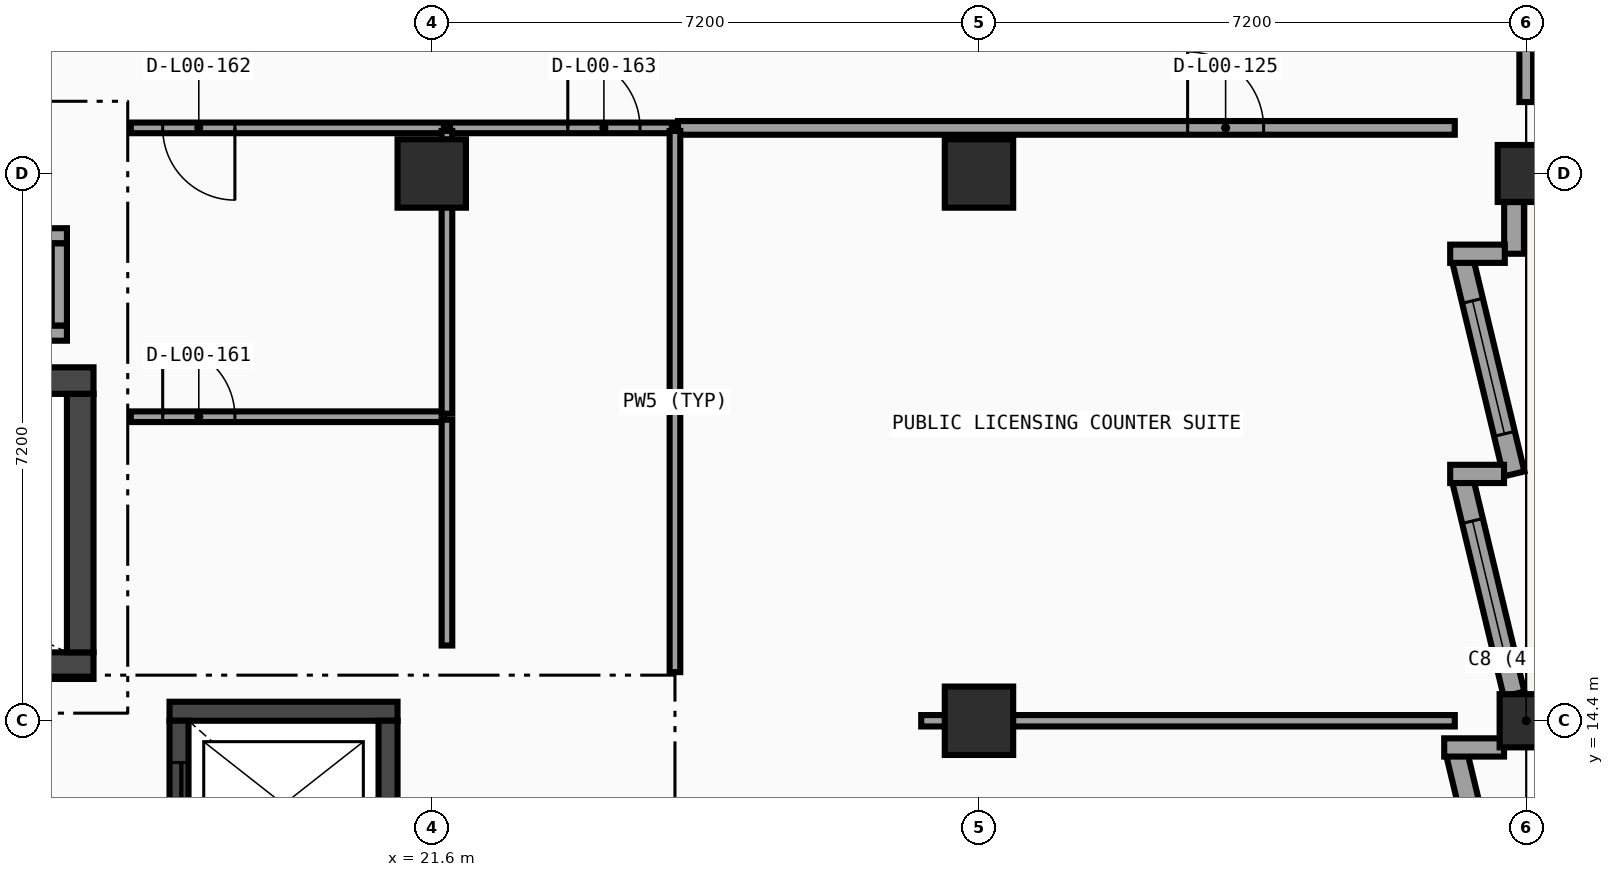
"""IFC4 building model, lengths in metres.
Left out: names, types, materials, properties, quantities, classifications, styles, units other than length and angle.
Written with IfcOpenShell. Run it as: python <this file> out.ifc"""

import sys

from ifc_helpers import new_model, si_unit, direction, frame, frame_2d, origin, origin_2d, place, context, subcontext, project, spatial, rectangle, circle, extrude, element, fill, save


model = new_model("IFC4")
c1 = context("Model", 3, precision=1e-05, world=origin(), true_north=direction((0.0, 1.0)))
c2 = subcontext(c1, "Body", "Model", "MODEL_VIEW")
j1 = project(units=[si_unit("LENGTHUNIT", "METRE"), si_unit("PLANEANGLEUNIT", "RADIAN")], contexts=[c1])
p1 = place(None, origin())
s1 = spatial("IfcSite", under=j1, at=p1, CompositionType="ELEMENT")
p2 = place(p1, origin())
s2 = spatial("IfcBuilding", under=s1, at=p2, CompositionType="ELEMENT")
p3 = place(p2, origin())
s3 = spatial("IfcBuildingStorey", under=s2, at=p3, CompositionType="ELEMENT", Elevation=0.0)
for number, where, z_axis, x_axis in (
    (1, (21.6, 21.6, 0.0), (0.0, 0.0, 1.0), (1.0, 0.0, 0.0)),
    (2, (28.8, 14.4, 0.0), (0.0, 0.0, 1.0), (1.0, 0.0, 0.0)),
    (3, (28.8, 21.6, 0.0), (0.0, 0.0, 1.0), (1.0, 0.0, 0.0)),
):
    element("IfcColumn", number, at=place(p3, frame(where, z_axis=z_axis, x_axis=x_axis)), inside=s3, PredefinedType="COLUMN", context=c2, shape_type="SweptSolid", body=[
        extrude(rectangle(XDim=0.9, YDim=0.9, at=origin_2d()), origin(), (0.0, 0.0, 1.0), 5.4),
    ])
p4 = place(p3, frame((36.0, 14.4, 0.0), z_axis=(0.0, 0.0, 1.0), x_axis=(1.0, 0.0, 0.0)))
e4 = element("IfcColumn", 4, at=p4, inside=s3, PredefinedType="COLUMN", context=c2, shape_type="SweptSolid", body=[
    extrude(circle(Radius=0.35, at=origin_2d()), origin(), (0.0, 0.0, 1.0), 5.4),
])
p5 = place(p3, frame((36.0, 21.6, 0.0), z_axis=(0.0, 0.0, 1.0), x_axis=(1.0, 0.0, 0.0)))
e5 = element("IfcColumn", 5, at=p5, inside=s3, PredefinedType="COLUMN", context=c2, shape_type="SweptSolid", body=[
    extrude(rectangle(XDim=0.75, YDim=0.75, at=origin_2d()), origin(), (0.0, 0.0, 1.0), 5.4),
])
p6 = place(p3, frame((35.84, 21.224, 0.0), z_axis=(0.0, 0.0, 1.0), x_axis=(0.0, -1.0, 0.0)))
e6 = element("IfcWall", 6, at=p6, inside=s3, PredefinedType="SOLIDWALL", context=c2, shape_type="SweptSolid", body=[
    extrude(rectangle(XDim=0.68, YDim=0.26, at=frame_2d((0.34, 0.0))), origin(), (0.0, 0.0, 1.0), 4.461),
])
p7 = place(p3, frame((35.167, 20.452, 0.0), z_axis=(0.0, 0.0, 1.0), x_axis=(0.233481813001, -0.97236116901, 0.0)))
e7 = element("IfcWall", 7, at=p7, inside=s3, PredefinedType="SOLIDWALL", context=c2, shape_type="SweptSolid", body=[
    extrude(rectangle(XDim=2.884, YDim=0.28, at=frame_2d((1.442, 0.0))), origin(), (0.0, 0.0, 1.0), 4.461),
])
p8 = place(p7, frame((0.542, 0.0, 0.8)))
e8 = element("IfcOpeningElement", 8, at=p8, cuts=e7, PredefinedType="OPENING", context=c2, shape_type="SweptSolid", body=[
    extrude(rectangle(XDim=1.8, YDim=1.85, at=frame_2d((0.9, 0.925))), frame((0.0, 0.15, 0.0), z_axis=(0.0, -1.0, 0.0), x_axis=(1.0, 0.0, 0.0)), (0.0, 0.0, 1.0), 0.3),
])
p9 = place(p3, frame((35.0, 20.544, 0.0), z_axis=(0.0, 0.0, 1.0), x_axis=(1.0, 0.0, 0.0)))
e9 = element("IfcWall", 9, at=p9, inside=s3, PredefinedType="SOLIDWALL", context=c2, shape_type="SweptSolid", body=[
    extrude(rectangle(XDim=0.719, YDim=0.24, at=frame_2d((0.359, 0.0))), origin(), (0.0, 0.0, 1.0), 5.12),
])
p10 = place(p3, frame((35.167, 17.555, 0.0), z_axis=(0.0, 0.0, 1.0), x_axis=(0.233481813001, -0.97236116901, 0.0)))
e10 = element("IfcWall", 10, at=p10, inside=s3, PredefinedType="SOLIDWALL", context=c2, shape_type="SweptSolid", body=[
    extrude(rectangle(XDim=2.884, YDim=0.28, at=frame_2d((1.442, 0.0))), origin(), (0.0, 0.0, 1.0), 4.461),
])
p11 = place(p10, frame((0.542, 0.0, 0.8)))
e11 = element("IfcOpeningElement", 11, at=p11, cuts=e10, PredefinedType="OPENING", context=c2, shape_type="SweptSolid", body=[
    extrude(rectangle(XDim=1.8, YDim=1.85, at=frame_2d((0.9, 0.925))), frame((0.0, 0.15, 0.0), z_axis=(0.0, -1.0, 0.0), x_axis=(1.0, 0.0, 0.0)), (0.0, 0.0, 1.0), 0.3),
])
p12 = place(p3, frame((35.0, 17.647, 0.0), z_axis=(0.0, 0.0, 1.0), x_axis=(1.0, 0.0, 0.0)))
e12 = element("IfcWall", 12, at=p12, inside=s3, PredefinedType="SOLIDWALL", context=c2, shape_type="SweptSolid", body=[
    extrude(rectangle(XDim=0.708, YDim=0.24, at=frame_2d((0.354, 0.0))), origin(), (0.0, 0.0, 1.0), 5.12),
])
p13 = place(p3, frame((35.088, 13.957, 0.0), z_axis=(0.0, 0.0, 1.0), x_axis=(0.233481900362, -0.972361148033, 0.0)))
e13 = element("IfcWall", 13, at=p13, inside=s3, PredefinedType="SOLIDWALL", context=c2, shape_type="SweptSolid", body=[
    extrude(rectangle(XDim=3.221, YDim=0.28, at=frame_2d((1.61, 0.0))), origin(), (0.0, 0.0, 1.0), 4.461),
])
p14 = place(p13, frame((0.81, 0.0, 0.8)))
e14 = element("IfcOpeningElement", 14, at=p14, cuts=e13, PredefinedType="OPENING", context=c2, shape_type="SweptSolid", body=[
    extrude(rectangle(XDim=1.6, YDim=1.75, at=frame_2d((0.8, 0.875))), frame((0.0, 0.15, 0.0), z_axis=(0.0, -1.0, 0.0), x_axis=(1.0, 0.0, 0.0)), (0.0, 0.0, 1.0), 0.3),
])
p15 = place(p3, frame((34.921, 14.049, 0.0), z_axis=(0.0, 0.0, 1.0), x_axis=(1.0, 0.0, 0.0)))
e15 = element("IfcWall", 15, at=p15, inside=s3, PredefinedType="SOLIDWALL", context=c2, shape_type="SweptSolid", body=[
    extrude(rectangle(XDim=0.787, YDim=0.24, at=frame_2d((0.394, 0.0))), origin(), (0.0, 0.0, 1.0), 5.12),
])
for number, where, z_axis, x_axis in (
    (16, (7.85, 15.125, 0.0), (0.0, 0.0, 1.0), (1.0, 0.0, 0.0)),
    (17, (17.15, 18.875, 0.0), (0.0, 0.0, 1.0), (-1.0, 0.0, 0.0)),
):
    element("IfcWall", number, at=place(p3, frame(where, z_axis=z_axis, x_axis=x_axis)), inside=s3, PredefinedType="SHEAR", context=c2, shape_type="SweptSolid", body=[
        extrude(rectangle(XDim=9.3, YDim=0.35, at=frame_2d((4.65, 0.0))), origin(), (0.0, 0.0, 1.0), 5.12),
    ])
p16 = place(p3, frame((16.975, 15.3, 0.0), z_axis=(0.0, 0.0, 1.0), x_axis=(0.0, 1.0, 0.0)))
e18 = element("IfcWall", 18, at=p16, inside=s3, PredefinedType="SHEAR", context=c2, shape_type="SweptSolid", body=[
    extrude(rectangle(XDim=3.4, YDim=0.35, at=frame_2d((1.7, 0.0))), origin(), (0.0, 0.0, 1.0), 5.12),
])
p17 = place(p3, frame((21.15, 14.525, 0.0), z_axis=(0.0, 0.0, 1.0), x_axis=(-1.0, 0.0, 0.0)))
e19 = element("IfcWall", 19, at=p17, inside=s3, PredefinedType="SHEAR", context=c2, shape_type="SweptSolid", body=[
    extrude(rectangle(XDim=3.0, YDim=0.25, at=frame_2d((1.5, 0.0))), origin(), (0.0, 0.0, 1.0), 5.12),
])
p18 = place(p3, frame((18.275, 14.4, 0.0), z_axis=(0.0, 0.0, 1.0), x_axis=(0.0, -1.0, 0.0)))
e20 = element("IfcWall", 20, at=p18, inside=s3, PredefinedType="SHEAR", context=c2, shape_type="SweptSolid", body=[
    extrude(rectangle(XDim=2.2, YDim=0.25, at=frame_2d((1.1, 0.0))), origin(), (0.0, 0.0, 1.0), 5.12),
])
p19 = place(p18, frame((0.55, 0.0, 0.0)))
e21 = element("IfcOpeningElement", 21, at=p19, cuts=e20, PredefinedType="OPENING", context=c2, shape_type="SweptSolid", body=[
    extrude(rectangle(XDim=1.1, YDim=2.1, at=frame_2d((0.55, 1.05))), frame((0.0, 0.135, 0.0), z_axis=(0.0, -1.0, 0.0), x_axis=(1.0, 0.0, 0.0)), (0.0, 0.0, 1.0), 0.27),
])
p20 = place(p3, frame((21.025, 12.2, 0.0), z_axis=(0.0, 0.0, 1.0), x_axis=(0.0, 1.0, 0.0)))
e22 = element("IfcWall", 22, at=p20, inside=s3, PredefinedType="SHEAR", context=c2, shape_type="SweptSolid", body=[
    extrude(rectangle(XDim=2.2, YDim=0.25, at=frame_2d((1.1, 0.0))), origin(), (0.0, 0.0, 1.0), 5.12),
])
for number, where, z_axis, x_axis in (
    (23, (15.2, 19.5, 0.0), (0.0, 0.0, 1.0), (1.0, 0.0, 0.0)),
    (24, (16.8, 20.78, 0.0), (0.0, 0.0, 1.0), (-1.0, 0.0, 0.0)),
):
    element("IfcWall", number, at=place(p3, frame(where, z_axis=z_axis, x_axis=x_axis)), inside=s3, PredefinedType="SOLIDWALL", context=c2, shape_type="SweptSolid", body=[
        extrude(rectangle(XDim=1.6, YDim=0.2, at=frame_2d((0.8, 0.0))), origin(), (0.0, 0.0, 1.0), 5.12),
    ])
p21 = place(p3, frame((16.7, 19.6, 0.0), z_axis=(0.0, 0.0, 1.0), x_axis=(0.0, 1.0, 0.0)))
e25 = element("IfcWall", 25, at=p21, inside=s3, PredefinedType="SOLIDWALL", context=c2, shape_type="SweptSolid", body=[
    extrude(rectangle(XDim=1.08, YDim=0.2, at=frame_2d((0.54, 0.0))), origin(), (0.0, 0.0, 1.0), 5.12),
])
p22 = place(p3, frame((24.84, 22.2, 0.0), z_axis=(0.0, 0.0, 1.0), x_axis=(1.0, 0.0, 0.0)))
e26 = element("IfcWall", 26, at=p22, inside=s3, PredefinedType="PARTITIONING", context=c2, shape_type="SweptSolid", body=[
    extrude(rectangle(XDim=10.22, YDim=0.18, at=frame_2d((5.11, 0.0))), origin(), (0.0, 0.0, 1.0), 4.311),
])
p23 = place(p22, frame((6.705, 0.0, 0.0)))
e27 = element("IfcOpeningElement", 27, at=p23, cuts=e26, PredefinedType="OPENING", context=c2, shape_type="SweptSolid", body=[
    extrude(rectangle(XDim=1.0, YDim=2.1, at=frame_2d((0.5, 1.05))), frame((0.0, 0.1, 0.0), z_axis=(0.0, -1.0, 0.0), x_axis=(1.0, 0.0, 0.0)), (0.0, 0.0, 1.0), 0.2),
])
p24 = place(p3, frame((36.0, 22.54, 0.0), z_axis=(0.0, 0.0, 1.0), x_axis=(0.0, 1.0, 0.0)))
e28 = element("IfcWall", 28, at=p24, inside=s3, PredefinedType="PARTITIONING", context=c2, shape_type="SweptSolid", body=[
    extrude(rectangle(XDim=2.22, YDim=0.18, at=frame_2d((1.11, 0.0))), origin(), (0.0, 0.0, 1.0), 4.461),
])
p25 = place(p3, frame((17.64, 22.2, 0.0), z_axis=(0.0, 0.0, 1.0), x_axis=(1.0, 0.0, 0.0)))
e29 = element("IfcWall", 29, at=p25, inside=s3, PredefinedType="PARTITIONING", context=c2, shape_type="SweptSolid", body=[
    extrude(rectangle(XDim=4.12, YDim=0.14, at=frame_2d((2.06, 0.0))), origin(), (0.0, 0.0, 1.0), 4.311),
])
p26 = place(p25, frame((0.42, 0.0, 0.0)))
e30 = element("IfcOpeningElement", 30, at=p26, cuts=e29, PredefinedType="OPENING", context=c2, shape_type="SweptSolid", body=[
    extrude(rectangle(XDim=0.95, YDim=2.08, at=frame_2d((0.475, 1.04))), frame((0.0, 0.08, 0.0), z_axis=(0.0, -1.0, 0.0), x_axis=(1.0, 0.0, 0.0)), (0.0, 0.0, 1.0), 0.16),
])
p27 = place(p3, frame((21.84, 22.2, 0.0), z_axis=(0.0, 0.0, 1.0), x_axis=(1.0, 0.0, 0.0)))
e31 = element("IfcWall", 31, at=p27, inside=s3, PredefinedType="PARTITIONING", context=c2, shape_type="SweptSolid", body=[
    extrude(rectangle(XDim=2.92, YDim=0.14, at=frame_2d((1.46, 0.0))), origin(), (0.0, 0.0, 1.0), 4.311),
])
p28 = place(p27, frame((1.55, 0.0, 0.0)))
e32 = element("IfcOpeningElement", 32, at=p28, cuts=e31, PredefinedType="OPENING", context=c2, shape_type="SweptSolid", body=[
    extrude(rectangle(XDim=0.95, YDim=2.08, at=frame_2d((0.475, 1.04))), frame((0.0, 0.08, 0.0), z_axis=(0.0, -1.0, 0.0), x_axis=(1.0, 0.0, 0.0)), (0.0, 0.0, 1.0), 0.16),
])
p29 = place(p3, frame((28.04, 14.4, 0.0), z_axis=(0.0, 0.0, 1.0), x_axis=(1.0, 0.0, 0.0)))
e33 = element("IfcWall", 33, at=p29, inside=s3, PredefinedType="PARTITIONING", context=c2, shape_type="SweptSolid", body=[
    extrude(rectangle(XDim=7.02, YDim=0.15, at=frame_2d((3.51, 0.0))), origin(), (0.0, 0.0, 1.0), 4.311),
])
p30 = place(p3, frame((24.8, 15.04, 0.0), z_axis=(0.0, 0.0, 1.0), x_axis=(0.0, 1.0, 0.0)))
e34 = element("IfcWall", 34, at=p30, inside=s3, PredefinedType="PARTITIONING", context=c2, shape_type="SweptSolid", body=[
    extrude(rectangle(XDim=7.12, YDim=0.14, at=frame_2d((3.56, 0.0))), origin(), (0.0, 0.0, 1.0), 4.45),
])
p31 = place(p3, frame((17.64, 18.4, 0.0), z_axis=(0.0, 0.0, 1.0), x_axis=(1.0, 0.0, 0.0)))
e35 = element("IfcWall", 35, at=p31, inside=s3, PredefinedType="PARTITIONING", context=c2, shape_type="SweptSolid", body=[
    extrude(rectangle(XDim=4.12, YDim=0.14, at=frame_2d((2.06, 0.0))), origin(), (0.0, 0.0, 1.0), 5.12),
])
p32 = place(p31, frame((0.42, 0.0, 0.0)))
e36 = element("IfcOpeningElement", 36, at=p32, cuts=e35, PredefinedType="OPENING", context=c2, shape_type="SweptSolid", body=[
    extrude(rectangle(XDim=0.95, YDim=2.08, at=frame_2d((0.475, 1.04))), frame((0.0, 0.08, 0.0), z_axis=(0.0, -1.0, 0.0), x_axis=(1.0, 0.0, 0.0)), (0.0, 0.0, 1.0), 0.16),
])
p33 = place(p3, frame((21.8, 15.39, 0.0), z_axis=(0.0, 0.0, 1.0), x_axis=(0.0, 1.0, 0.0)))
e37 = element("IfcWall", 37, at=p33, inside=s3, PredefinedType="PARTITIONING", context=c2, shape_type="SweptSolid", body=[
    extrude(rectangle(XDim=2.97, YDim=0.14, at=frame_2d((1.485, 0.0))), origin(), (0.0, 0.0, 1.0), 5.12),
])
p34 = place(p3, frame((21.8, 18.44, 0.0), z_axis=(0.0, 0.0, 1.0), x_axis=(0.0, 1.0, 0.0)))
e38 = element("IfcWall", 38, at=p34, inside=s3, PredefinedType="PARTITIONING", context=c2, shape_type="SweptSolid", body=[
    extrude(rectangle(XDim=3.72, YDim=0.14, at=frame_2d((1.86, 0.0))), origin(), (0.0, 0.0, 1.0), 4.311),
])
p35 = place(p8, origin())
e39 = element("IfcWindow", 39, at=p35, inside=s3, PartitioningType="SINGLE_PANEL", PredefinedType="WINDOW", context=c2, shape_type="SweptSolid", body=[
    extrude(rectangle(XDim=1.8, YDim=1.85, at=frame_2d((0.9, 0.925))), frame((0.0, 0.03, 0.0), z_axis=(0.0, -1.0, 0.0), x_axis=(1.0, 0.0, 0.0)), (0.0, 0.0, 1.0), 0.06),
])
fill(e8, e39)
p36 = place(p11, origin())
e40 = element("IfcWindow", 40, at=p36, inside=s3, PartitioningType="SINGLE_PANEL", PredefinedType="WINDOW", context=c2, shape_type="SweptSolid", body=[
    extrude(rectangle(XDim=1.8, YDim=1.85, at=frame_2d((0.9, 0.925))), frame((0.0, 0.03, 0.0), z_axis=(0.0, -1.0, 0.0), x_axis=(1.0, 0.0, 0.0)), (0.0, 0.0, 1.0), 0.06),
])
fill(e11, e40)
p37 = place(p19, origin())
e41 = element("IfcDoor", 41, at=p37, inside=s3, OperationType="SLIDING_TO_LEFT", PredefinedType="DOOR", context=c2, shape_type="SweptSolid", body=[
    extrude(rectangle(XDim=1.1, YDim=2.1, at=frame_2d((0.55, 1.05))), frame((0.0, 0.025, 0.0), z_axis=(0.0, -1.0, 0.0), x_axis=(1.0, 0.0, 0.0)), (0.0, 0.0, 1.0), 0.05),
])
fill(e21, e41)
p38 = place(p23, origin())
e42 = element("IfcDoor", 42, at=p38, inside=s3, OperationType="SINGLE_SWING_LEFT", PredefinedType="DOOR", context=c2, shape_type="SweptSolid", body=[
    extrude(rectangle(XDim=1.0, YDim=2.1, at=frame_2d((0.5, 1.05))), frame((0.0, 0.025, 0.0), z_axis=(0.0, -1.0, 0.0), x_axis=(1.0, 0.0, 0.0)), (0.0, 0.0, 1.0), 0.05),
])
fill(e27, e42)
p39 = place(p32, origin())
e43 = element("IfcDoor", 43, at=p39, inside=s3, OperationType="SINGLE_SWING_LEFT", PredefinedType="DOOR", context=c2, shape_type="SweptSolid", body=[
    extrude(rectangle(XDim=0.95, YDim=2.08, at=frame_2d((0.475, 1.04))), frame((0.0, 0.025, 0.0), z_axis=(0.0, -1.0, 0.0), x_axis=(1.0, 0.0, 0.0)), (0.0, 0.0, 1.0), 0.05),
])
fill(e36, e43)
p40 = place(p26, origin())
e44 = element("IfcDoor", 44, at=p40, inside=s3, OperationType="SINGLE_SWING_RIGHT", PredefinedType="DOOR", context=c2, shape_type="SweptSolid", body=[
    extrude(rectangle(XDim=0.95, YDim=2.08, at=frame_2d((0.475, 1.04))), frame((0.0, 0.025, 0.0), z_axis=(0.0, -1.0, 0.0), x_axis=(1.0, 0.0, 0.0)), (0.0, 0.0, 1.0), 0.05),
])
fill(e30, e44)
p41 = place(p28, origin())
e45 = element("IfcDoor", 45, at=p41, inside=s3, OperationType="SINGLE_SWING_LEFT", PredefinedType="DOOR", context=c2, shape_type="SweptSolid", body=[
    extrude(rectangle(XDim=0.95, YDim=2.08, at=frame_2d((0.475, 1.04))), frame((0.0, 0.025, 0.0), z_axis=(0.0, -1.0, 0.0), x_axis=(1.0, 0.0, 0.0)), (0.0, 0.0, 1.0), 0.05),
])
fill(e32, e45)
save(model, sys.argv[1])
